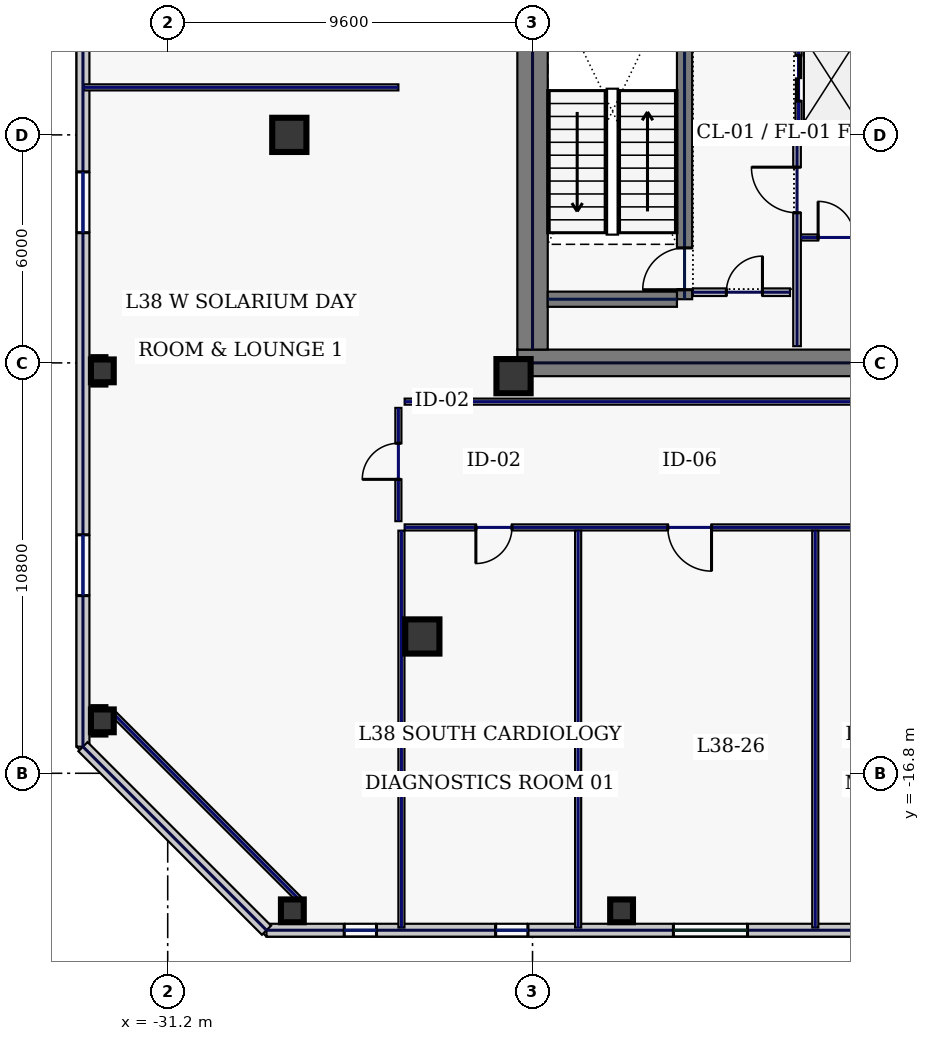
"""IFC4 building model, lengths in metres.
Left out: names, types, materials, properties, quantities, classifications, styles, units other than length and angle.
Written with IfcOpenShell. Run it as: python <this file> out.ifc"""

import sys

from ifc_helpers import new_model, si_unit, direction, frame, frame_2d, origin, origin_2d, place, context, subcontext, project, spatial, rectangle, hollow_rectangle, extrude, element, fill, save


model = new_model("IFC4")
c1 = context("Model", 3, precision=1e-05, world=origin(), true_north=direction((0.0, 1.0)))
c2 = subcontext(c1, "Body", "Model", "MODEL_VIEW")
j1 = project(units=[si_unit("LENGTHUNIT", "METRE"), si_unit("PLANEANGLEUNIT", "RADIAN")], contexts=[c1])
p1 = place(None, origin())
s1 = spatial("IfcSite", under=j1, at=p1, CompositionType="ELEMENT")
p2 = place(p1, origin())
s2 = spatial("IfcBuilding", under=s1, at=p2, CompositionType="ELEMENT")
p3 = place(p2, frame((0.0, 0.0, 168.2)))
s3 = spatial("IfcBuildingStorey", under=s2, at=p3, CompositionType="ELEMENT", Elevation=168.2)
p4 = place(p3, frame((-22.0, -6.0, 0.0), z_axis=(0.0, 0.0, 1.0), x_axis=(1.0, 0.0, 0.0)))
e1 = element("IfcWall", 1, at=p4, inside=s3, PredefinedType="SHEAR", context=c2, shape_type="SweptSolid", body=[
    extrude(rectangle(XDim=11.55, YDim=0.7, at=frame_2d((5.775, 0.0))), origin(), (0.0, 0.0, 1.0), 3.74),
])
p5 = place(p3, frame((-21.6, -5.65, 0.0), z_axis=(0.0, 0.0, 1.0), x_axis=(0.0, 1.0, 0.0)))
e2 = element("IfcWall", 2, at=p5, inside=s3, PredefinedType="SHEAR", context=c2, shape_type="SweptSolid", body=[
    extrude(rectangle(XDim=11.3, YDim=0.8, at=frame_2d((5.65, 0.0))), origin(), (0.0, 0.0, 1.0), 3.74),
])
p6 = place(p3, frame((-17.6, -4.325, 0.0), z_axis=(0.0, 0.0, 1.0), x_axis=(0.0, 1.0, 0.0)))
e3 = element("IfcWall", 3, at=p6, inside=s3, PredefinedType="SHEAR", context=c2, shape_type="SweptSolid", body=[
    extrude(rectangle(XDim=8.65, YDim=0.4, at=frame_2d((4.325, 0.0))), origin(), (0.0, 0.0, 1.0), 3.74),
])
p7 = place(p6, frame((0.25, 0.0, 0.0)))
e4 = element("IfcOpeningElement", 4, at=p7, cuts=e3, PredefinedType="OPENING", context=c2, shape_type="SweptSolid", body=[
    extrude(rectangle(XDim=1.1, YDim=2.2, at=frame_2d((0.55, 1.1))), frame((0.0, 0.21, 0.0), z_axis=(0.0, -1.0, 0.0), x_axis=(1.0, 0.0, 0.0)), (0.0, 0.0, 1.0), 0.42),
])
p8 = place(p3, frame((-21.2, -4.325, 0.0), z_axis=(0.0, 0.0, 1.0), x_axis=(1.0, 0.0, 0.0)))
e5 = element("IfcWall", 5, at=p8, inside=s3, PredefinedType="SHEAR", context=c2, shape_type="SweptSolid", body=[
    extrude(rectangle(XDim=3.4, YDim=0.4, at=frame_2d((1.7, 0.0))), origin(), (0.0, 0.0, 1.0), 3.74),
])
for number, where, z_axis, x_axis in (
    (6, (-22.1, -6.35, 0.0), (0.0, 0.0, 1.0), (1.0, 0.0, 0.0)),
    (7, (-24.5, -13.2, 0.0), (0.0, 0.0, 1.0), (1.0, 0.0, 0.0)),
    (8, (-28.0, 0.0, 0.0), (0.0, 0.0, 1.0), (1.0, 0.0, 0.0)),
):
    element("IfcColumn", number, at=place(p3, frame(where, z_axis=z_axis, x_axis=x_axis)), inside=s3, PredefinedType="COLUMN", context=c2, shape_type="SweptSolid", body=[
        extrude(hollow_rectangle(XDim=0.9, YDim=0.9, WallThickness=0.04, at=origin_2d()), origin(), (0.0, 0.0, 1.0), 3.74),
    ])
for number, where, z_axis, x_axis in (
    (9, (-27.92, -20.42, 0.0), (0.0, 0.0, 1.0), (1.0, 0.0, 0.0)),
    (10, (-19.257, -20.42, 0.0), (0.0, 0.0, 1.0), (1.0, 0.0, 0.0)),
    (11, (-32.92, -6.21, 0.0), (0.0, 0.0, 1.0), (1.0, 0.0, 0.0)),
    (12, (-32.92, -15.42, 0.0), (0.0, 0.0, 1.0), (1.0, 0.0, 0.0)),
):
    element("IfcColumn", number, at=place(p3, frame(where, z_axis=z_axis, x_axis=x_axis)), inside=s3, PredefinedType="COLUMN", context=c2, shape_type="SweptSolid", body=[
        extrude(hollow_rectangle(XDim=0.6, YDim=0.6, WallThickness=0.028, at=origin_2d()), origin(), (0.0, 0.0, 1.0), 3.74),
    ])
p9 = place(p3, frame((-28.6, -20.93, 0.0), z_axis=(0.0, 0.0, 1.0), x_axis=(1.0, 0.0, 0.0)))
e13 = element("IfcWall", 13, at=p9, inside=s3, PredefinedType="STANDARD", context=c2, shape_type="SweptSolid", body=[
    extrude(rectangle(XDim=19.937, YDim=0.34, at=frame_2d((9.969, 0.0))), origin(), (0.0, 0.0, 1.0), 3.74),
])
p10 = place(p9, frame((2.044, 0.0, 0.8)))
e14 = element("IfcOpeningElement", 14, at=p10, cuts=e13, PredefinedType="OPENING", context=c2, shape_type="SweptSolid", body=[
    extrude(rectangle(XDim=0.85, YDim=1.85, at=frame_2d((0.425, 0.925))), frame((0.0, 0.18, 0.0), z_axis=(0.0, -1.0, 0.0), x_axis=(1.0, 0.0, 0.0)), (0.0, 0.0, 1.0), 0.36),
])
p11 = place(p9, frame((6.029, 0.0, 0.8)))
e15 = element("IfcOpeningElement", 15, at=p11, cuts=e13, PredefinedType="OPENING", context=c2, shape_type="SweptSolid", body=[
    extrude(rectangle(XDim=0.85, YDim=1.85, at=frame_2d((0.425, 0.925))), frame((0.0, 0.18, 0.0), z_axis=(0.0, -1.0, 0.0), x_axis=(1.0, 0.0, 0.0)), (0.0, 0.0, 1.0), 0.36),
])
p12 = place(p9, frame((10.707, 0.0, 0.8)))
e16 = element("IfcOpeningElement", 16, at=p12, cuts=e13, PredefinedType="OPENING", context=c2, shape_type="SweptSolid", body=[
    extrude(rectangle(XDim=1.95, YDim=2.1, at=frame_2d((0.975, 1.05))), frame((0.0, 0.18, 0.0), z_axis=(0.0, -1.0, 0.0), x_axis=(1.0, 0.0, 0.0)), (0.0, 0.0, 1.0), 0.36),
])
p13 = place(p9, frame((15.792, 0.0, 0.8)))
e17 = element("IfcOpeningElement", 17, at=p13, cuts=e13, PredefinedType="OPENING", context=c2, shape_type="SweptSolid", body=[
    extrude(rectangle(XDim=0.85, YDim=1.85, at=frame_2d((0.425, 0.925))), frame((0.0, 0.18, 0.0), z_axis=(0.0, -1.0, 0.0), x_axis=(1.0, 0.0, 0.0)), (0.0, 0.0, 1.0), 0.36),
])
p14 = place(p3, frame((-33.43, 22.1, 0.0), z_axis=(0.0, 0.0, 1.0), x_axis=(0.0, -1.0, 0.0)))
e18 = element("IfcWall", 18, at=p14, inside=s3, PredefinedType="STANDARD", context=c2, shape_type="SweptSolid", body=[
    extrude(rectangle(XDim=38.2, YDim=0.34, at=frame_2d((19.1, 0.0))), origin(), (0.0, 0.0, 1.0), 3.74),
])
p15 = place(p14, frame((3.975, 0.0, 0.58)))
e19 = element("IfcOpeningElement", 19, at=p15, cuts=e18, PredefinedType="OPENING", context=c2, shape_type="SweptSolid", body=[
    extrude(rectangle(XDim=1.6, YDim=2.3, at=frame_2d((0.8, 1.15))), frame((0.0, 0.18, 0.0), z_axis=(0.0, -1.0, 0.0), x_axis=(1.0, 0.0, 0.0)), (0.0, 0.0, 1.0), 0.36),
])
p16 = place(p14, frame((13.525, 0.0, 0.58)))
e20 = element("IfcOpeningElement", 20, at=p16, cuts=e18, PredefinedType="OPENING", context=c2, shape_type="SweptSolid", body=[
    extrude(rectangle(XDim=1.6, YDim=2.3, at=frame_2d((0.8, 1.15))), frame((0.0, 0.18, 0.0), z_axis=(0.0, -1.0, 0.0), x_axis=(1.0, 0.0, 0.0)), (0.0, 0.0, 1.0), 0.36),
])
p17 = place(p14, frame((23.075, 0.0, 0.58)))
e21 = element("IfcOpeningElement", 21, at=p17, cuts=e18, PredefinedType="OPENING", context=c2, shape_type="SweptSolid", body=[
    extrude(rectangle(XDim=1.6, YDim=2.3, at=frame_2d((0.8, 1.15))), frame((0.0, 0.18, 0.0), z_axis=(0.0, -1.0, 0.0), x_axis=(1.0, 0.0, 0.0)), (0.0, 0.0, 1.0), 0.36),
])
p18 = place(p14, frame((32.625, 0.0, 0.58)))
e22 = element("IfcOpeningElement", 22, at=p18, cuts=e18, PredefinedType="OPENING", context=c2, shape_type="SweptSolid", body=[
    extrude(rectangle(XDim=1.6, YDim=2.3, at=frame_2d((0.8, 1.15))), frame((0.0, 0.18, 0.0), z_axis=(0.0, -1.0, 0.0), x_axis=(1.0, 0.0, 0.0)), (0.0, 0.0, 1.0), 0.36),
])
p19 = place(p3, frame((-33.43, -16.1, 0.0), z_axis=(0.0, 0.0, 1.0), x_axis=(0.707106781187, -0.707106781187, 0.0)))
e23 = element("IfcWall", 23, at=p19, inside=s3, PredefinedType="STANDARD", context=c2, shape_type="SweptSolid", body=[
    extrude(rectangle(XDim=6.83, YDim=0.34, at=frame_2d((3.415, 0.0))), origin(), (0.0, 0.0, 1.0), 3.74),
])
p20 = place(p3, frame((-14.6, 0.12, 0.0), z_axis=(0.0, 0.0, 1.0), x_axis=(0.0, 1.0, 0.0)))
e24 = element("IfcWall", 24, at=p20, inside=s3, PredefinedType="PARTITIONING", context=c2, shape_type="SweptSolid", body=[
    extrude(rectangle(XDim=2.74, YDim=0.16, at=frame_2d((1.37, 0.0))), origin(), (0.0, 0.0, 1.0), 3.74),
])
p21 = place(p20, frame((0.77, 0.0, 0.0)))
e25 = element("IfcOpeningElement", 25, at=p21, cuts=e24, PredefinedType="OPENING", context=c2, shape_type="SweptSolid", body=[
    extrude(rectangle(XDim=1.2, YDim=2.2, at=frame_2d((0.6, 1.1))), frame((0.0, 0.09, 0.0), z_axis=(0.0, -1.0, 0.0), x_axis=(1.0, 0.0, 0.0)), (0.0, 0.0, 1.0), 0.18),
])
p22 = place(p3, frame((-14.6, 0.1, 0.0), z_axis=(0.0, 0.0, 1.0), x_axis=(1.0, 0.0, 0.0)))
e26 = element("IfcWall", 26, at=p22, inside=s3, PredefinedType="PARTITIONING", context=c2, shape_type="SweptSolid", body=[
    extrude(rectangle(XDim=1.76, YDim=0.16, at=frame_2d((0.88, 0.0))), origin(), (0.0, 0.0, 1.0), 3.74),
])
p23 = place(p3, frame((-17.38, -4.14, 0.0), z_axis=(0.0, 0.0, 1.0), x_axis=(1.0, 0.0, 0.0)))
e27 = element("IfcWall", 27, at=p23, inside=s3, PredefinedType="SOLIDWALL", context=c2, shape_type="SweptSolid", body=[
    extrude(rectangle(XDim=2.555, YDim=0.2, at=frame_2d((1.277, 0.0))), origin(), (0.0, 0.0, 1.0), 3.74),
])
p24 = place(p23, frame((0.88, 0.0, 0.0)))
e28 = element("IfcOpeningElement", 28, at=p24, cuts=e27, PredefinedType="OPENING", context=c2, shape_type="SweptSolid", body=[
    extrude(rectangle(XDim=0.95, YDim=2.2, at=frame_2d((0.475, 1.1))), frame((0.0, 0.11, 0.0), z_axis=(0.0, -1.0, 0.0), x_axis=(1.0, 0.0, 0.0)), (0.0, 0.0, 1.0), 0.22),
])
p25 = place(p3, frame((-14.535, -2.7, 0.0), z_axis=(0.0, 0.0, 1.0), x_axis=(1.0, 0.0, 0.0)))
e29 = element("IfcWall", 29, at=p25, inside=s3, PredefinedType="PARTITIONING", context=c2, shape_type="SweptSolid", body=[
    extrude(rectangle(XDim=1.76, YDim=0.16, at=frame_2d((0.88, 0.0))), origin(), (0.0, 0.0, 1.0), 3.74),
])
p26 = place(p25, frame((0.45, 0.0, 0.0)))
e30 = element("IfcOpeningElement", 30, at=p26, cuts=e29, PredefinedType="OPENING", context=c2, shape_type="SweptSolid", body=[
    extrude(rectangle(XDim=0.95, YDim=2.2, at=frame_2d((0.475, 1.1))), frame((0.0, 0.09, 0.0), z_axis=(0.0, -1.0, 0.0), x_axis=(1.0, 0.0, 0.0)), (0.0, 0.0, 1.0), 0.18),
])
p27 = place(p3, frame((-14.64, -5.56, 0.0), z_axis=(0.0, 0.0, 1.0), x_axis=(0.0, 1.0, 0.0)))
e31 = element("IfcWall", 31, at=p27, inside=s3, PredefinedType="SOLIDWALL", context=c2, shape_type="SweptSolid", body=[
    extrude(rectangle(XDim=5.6, YDim=0.2, at=frame_2d((2.8, 0.0))), origin(), (0.0, 0.0, 1.0), 3.74),
])
p28 = place(p27, frame((3.51, 0.0, 0.0)))
e32 = element("IfcOpeningElement", 32, at=p28, cuts=e31, PredefinedType="OPENING", context=c2, shape_type="SweptSolid", body=[
    extrude(rectangle(XDim=1.2, YDim=2.2, at=frame_2d((0.6, 1.1))), frame((0.0, 0.11, 0.0), z_axis=(0.0, -1.0, 0.0), x_axis=(1.0, 0.0, 0.0)), (0.0, 0.0, 1.0), 0.22),
])
p29 = place(p3, frame((-32.68, -15.18, 0.0), z_axis=(0.0, 0.0, 1.0), x_axis=(0.707106781187, -0.707106781187, 0.0)))
e33 = element("IfcWall", 33, at=p29, inside=s3, PredefinedType="PARTITIONING", context=c2, shape_type="SweptSolid", body=[
    extrude(rectangle(XDim=7.071, YDim=0.16, at=frame_2d((3.536, 0.0))), origin(), (0.0, 0.0, 1.0), 3.74),
])
p30 = place(p3, frame((-25.13, -10.165, 0.0), z_axis=(0.0, 0.0, 1.0), x_axis=(0.0, 1.0, 0.0)))
e34 = element("IfcWall", 34, at=p30, inside=s3, PredefinedType="PARTITIONING", context=c2, shape_type="SweptSolid", body=[
    extrude(rectangle(XDim=2.98, YDim=0.16, at=frame_2d((1.49, 0.0))), origin(), (0.0, 0.0, 1.0), 3.74),
])
p31 = place(p30, frame((1.1, 0.0, 0.0)))
e35 = element("IfcOpeningElement", 35, at=p31, cuts=e34, PredefinedType="OPENING", context=c2, shape_type="SweptSolid", body=[
    extrude(rectangle(XDim=0.95, YDim=2.2, at=frame_2d((0.475, 1.1))), frame((0.0, 0.09, 0.0), z_axis=(0.0, -1.0, 0.0), x_axis=(1.0, 0.0, 0.0)), (0.0, 0.0, 1.0), 0.18),
])
p32 = place(p3, frame((-24.965, -7.02, 0.0), z_axis=(0.0, 0.0, 1.0), x_axis=(1.0, 0.0, 0.0)))
e36 = element("IfcWall", 36, at=p32, inside=s3, PredefinedType="PARTITIONING", context=c2, shape_type="SweptSolid", body=[
    extrude(rectangle(XDim=14.25, YDim=0.16, at=frame_2d((7.125, 0.0))), origin(), (0.0, 0.0, 1.0), 3.74),
])
p33 = place(p3, frame((24.965, -10.33, 0.0), z_axis=(0.0, 0.0, 1.0), x_axis=(-1.0, 0.0, 0.0)))
e37 = element("IfcWall", 37, at=p33, inside=s3, PredefinedType="PARTITIONING", context=c2, shape_type="SweptSolid", body=[
    extrude(rectangle(XDim=49.93, YDim=0.16, at=frame_2d((24.965, 0.0))), origin(), (0.0, 0.0, 1.0), 3.74),
])
p34 = place(p33, frame((47.106, 0.0, 0.0)))
e38 = element("IfcOpeningElement", 38, at=p34, cuts=e37, PredefinedType="OPENING", context=c2, shape_type="SweptSolid", body=[
    extrude(rectangle(XDim=0.95, YDim=2.2, at=frame_2d((0.475, 1.1))), frame((0.0, 0.09, 0.0), z_axis=(0.0, -1.0, 0.0), x_axis=(1.0, 0.0, 0.0)), (0.0, 0.0, 1.0), 0.18),
])
p35 = place(p33, frame((41.855, 0.0, 0.0)))
e39 = element("IfcOpeningElement", 39, at=p35, cuts=e37, PredefinedType="OPENING", context=c2, shape_type="SweptSolid", body=[
    extrude(rectangle(XDim=1.15, YDim=2.2, at=frame_2d((0.575, 1.1))), frame((0.0, 0.09, 0.0), z_axis=(0.0, -1.0, 0.0), x_axis=(1.0, 0.0, 0.0)), (0.0, 0.0, 1.0), 0.18),
])
p36 = place(p33, frame((35.18, 0.0, 0.0)))
e40 = element("IfcOpeningElement", 40, at=p36, cuts=e37, PredefinedType="OPENING", context=c2, shape_type="SweptSolid", body=[
    extrude(rectangle(XDim=1.3, YDim=2.2, at=frame_2d((0.65, 1.1))), frame((0.0, 0.09, 0.0), z_axis=(0.0, -1.0, 0.0), x_axis=(1.0, 0.0, 0.0)), (0.0, 0.0, 1.0), 0.18),
])
p37 = place(p33, frame((27.37, 0.0, 0.0)))
e41 = element("IfcOpeningElement", 41, at=p37, cuts=e37, PredefinedType="OPENING", context=c2, shape_type="SweptSolid", body=[
    extrude(rectangle(XDim=1.05, YDim=2.2, at=frame_2d((0.525, 1.1))), frame((0.0, 0.09, 0.0), z_axis=(0.0, -1.0, 0.0), x_axis=(1.0, 0.0, 0.0)), (0.0, 0.0, 1.0), 0.18),
])
p38 = place(p33, frame((18.72, 0.0, 0.0)))
e42 = element("IfcOpeningElement", 42, at=p38, cuts=e37, PredefinedType="OPENING", context=c2, shape_type="SweptSolid", body=[
    extrude(rectangle(XDim=0.95, YDim=2.2, at=frame_2d((0.475, 1.1))), frame((0.0, 0.09, 0.0), z_axis=(0.0, -1.0, 0.0), x_axis=(1.0, 0.0, 0.0)), (0.0, 0.0, 1.0), 0.18),
])
p39 = place(p33, frame((10.425, 0.0, 0.0)))
e43 = element("IfcOpeningElement", 43, at=p39, cuts=e37, PredefinedType="OPENING", context=c2, shape_type="SweptSolid", body=[
    extrude(rectangle(XDim=0.95, YDim=2.2, at=frame_2d((0.475, 1.1))), frame((0.0, 0.09, 0.0), z_axis=(0.0, -1.0, 0.0), x_axis=(1.0, 0.0, 0.0)), (0.0, 0.0, 1.0), 0.18),
])
p40 = place(p33, frame((3.044, 0.0, 0.0)))
e44 = element("IfcOpeningElement", 44, at=p40, cuts=e37, PredefinedType="OPENING", context=c2, shape_type="SweptSolid", body=[
    extrude(rectangle(XDim=0.95, YDim=2.2, at=frame_2d((0.475, 1.1))), frame((0.0, 0.09, 0.0), z_axis=(0.0, -1.0, 0.0), x_axis=(1.0, 0.0, 0.0)), (0.0, 0.0, 1.0), 0.18),
])
for number, where, z_axis, x_axis in (
    (45, (-25.05, -20.86, 0.0), (0.0, 0.0, 1.0), (0.0, 1.0, 0.0)),
    (46, (-20.4, -20.86, 0.0), (0.0, 0.0, 1.0), (0.0, 1.0, 0.0)),
    (47, (-14.16, -20.86, 0.0), (0.0, 0.0, 1.0), (0.0, 1.0, 0.0)),
):
    element("IfcWall", number, at=place(p3, frame(where, z_axis=z_axis, x_axis=x_axis)), inside=s3, PredefinedType="PARTITIONING", context=c2, shape_type="SweptSolid", body=[
        extrude(rectangle(XDim=10.445, YDim=0.16, at=frame_2d((5.223, 0.0))), origin(), (0.0, 0.0, 1.0), 3.74),
    ])
p41 = place(p3, frame((-33.41, 1.25, 0.0), z_axis=(0.0, 0.0, 1.0), x_axis=(1.0, 0.0, 0.0)))
e48 = element("IfcWall", 48, at=p41, inside=s3, PredefinedType="PARTITIONING", context=c2, shape_type="SweptSolid", body=[
    extrude(rectangle(XDim=8.28, YDim=0.16, at=frame_2d((4.14, 0.0))), origin(), (0.0, 0.0, 1.0), 3.74),
])
p42 = place(p10, origin())
e49 = element("IfcWindow", 49, at=p42, inside=s3, PartitioningType="SINGLE_PANEL", PredefinedType="WINDOW", context=c2, shape_type="SweptSolid", body=[
    extrude(rectangle(XDim=0.85, YDim=1.85, at=frame_2d((0.425, 0.925))), frame((0.0, 0.03, 0.0), z_axis=(0.0, -1.0, 0.0), x_axis=(1.0, 0.0, 0.0)), (0.0, 0.0, 1.0), 0.06),
])
fill(e14, e49)
p43 = place(p11, origin())
e50 = element("IfcWindow", 50, at=p43, inside=s3, PartitioningType="SINGLE_PANEL", PredefinedType="WINDOW", context=c2, shape_type="SweptSolid", body=[
    extrude(rectangle(XDim=0.85, YDim=1.85, at=frame_2d((0.425, 0.925))), frame((0.0, 0.03, 0.0), z_axis=(0.0, -1.0, 0.0), x_axis=(1.0, 0.0, 0.0)), (0.0, 0.0, 1.0), 0.06),
])
fill(e15, e50)
p44 = place(p12, origin())
e51 = element("IfcWindow", 51, at=p44, inside=s3, PartitioningType="SINGLE_PANEL", PredefinedType="WINDOW", context=c2, shape_type="SweptSolid", body=[
    extrude(rectangle(XDim=1.95, YDim=2.1, at=frame_2d((0.975, 1.05))), frame((0.0, 0.03, 0.0), z_axis=(0.0, -1.0, 0.0), x_axis=(1.0, 0.0, 0.0)), (0.0, 0.0, 1.0), 0.06),
])
fill(e16, e51)
p45 = place(p17, origin())
e52 = element("IfcWindow", 52, at=p45, inside=s3, PartitioningType="SINGLE_PANEL", PredefinedType="WINDOW", context=c2, shape_type="SweptSolid", body=[
    extrude(rectangle(XDim=1.6, YDim=2.3, at=frame_2d((0.8, 1.15))), frame((0.0, 0.03, 0.0), z_axis=(0.0, -1.0, 0.0), x_axis=(1.0, 0.0, 0.0)), (0.0, 0.0, 1.0), 0.06),
])
fill(e21, e52)
p46 = place(p18, origin())
e53 = element("IfcWindow", 53, at=p46, inside=s3, PartitioningType="SINGLE_PANEL", PredefinedType="WINDOW", context=c2, shape_type="SweptSolid", body=[
    extrude(rectangle(XDim=1.6, YDim=2.3, at=frame_2d((0.8, 1.15))), frame((0.0, 0.03, 0.0), z_axis=(0.0, -1.0, 0.0), x_axis=(1.0, 0.0, 0.0)), (0.0, 0.0, 1.0), 0.06),
])
fill(e22, e53)
p47 = place(p7, origin())
e54 = element("IfcDoor", 54, at=p47, inside=s3, OperationType="SINGLE_SWING_LEFT", PredefinedType="DOOR", context=c2, shape_type="SweptSolid", body=[
    extrude(rectangle(XDim=1.1, YDim=2.2, at=frame_2d((0.55, 1.1))), frame((0.0, 0.025, 0.0), z_axis=(0.0, -1.0, 0.0), x_axis=(1.0, 0.0, 0.0)), (0.0, 0.0, 1.0), 0.05),
])
fill(e4, e54)
p48 = place(p21, origin())
e55 = element("IfcDoor", 55, at=p48, inside=s3, OperationType="SLIDING_TO_LEFT", PredefinedType="DOOR", context=c2, shape_type="SweptSolid", body=[
    extrude(rectangle(XDim=1.2, YDim=2.2, at=frame_2d((0.6, 1.1))), frame((0.0, 0.025, 0.0), z_axis=(0.0, -1.0, 0.0), x_axis=(1.0, 0.0, 0.0)), (0.0, 0.0, 1.0), 0.05),
])
fill(e25, e55)
p49 = place(p24, origin())
e56 = element("IfcDoor", 56, at=p49, inside=s3, OperationType="SINGLE_SWING_RIGHT", PredefinedType="DOOR", context=c2, shape_type="SweptSolid", body=[
    extrude(rectangle(XDim=0.95, YDim=2.2, at=frame_2d((0.475, 1.1))), frame((0.0, 0.025, 0.0), z_axis=(0.0, -1.0, 0.0), x_axis=(1.0, 0.0, 0.0)), (0.0, 0.0, 1.0), 0.05),
])
fill(e28, e56)
p50 = place(p26, origin())
e57 = element("IfcDoor", 57, at=p50, inside=s3, OperationType="SINGLE_SWING_LEFT", PredefinedType="DOOR", context=c2, shape_type="SweptSolid", body=[
    extrude(rectangle(XDim=0.95, YDim=2.2, at=frame_2d((0.475, 1.1))), frame((0.0, 0.025, 0.0), z_axis=(0.0, -1.0, 0.0), x_axis=(1.0, 0.0, 0.0)), (0.0, 0.0, 1.0), 0.05),
])
fill(e30, e57)
p51 = place(p28, origin())
e58 = element("IfcDoor", 58, at=p51, inside=s3, OperationType="SINGLE_SWING_RIGHT", PredefinedType="DOOR", context=c2, shape_type="SweptSolid", body=[
    extrude(rectangle(XDim=1.2, YDim=2.2, at=frame_2d((0.6, 1.1))), frame((0.0, 0.025, 0.0), z_axis=(0.0, -1.0, 0.0), x_axis=(1.0, 0.0, 0.0)), (0.0, 0.0, 1.0), 0.05),
])
fill(e32, e58)
p52 = place(p34, origin())
e59 = element("IfcDoor", 59, at=p52, inside=s3, OperationType="SINGLE_SWING_RIGHT", PredefinedType="DOOR", context=c2, shape_type="SweptSolid", body=[
    extrude(rectangle(XDim=0.95, YDim=2.2, at=frame_2d((0.475, 1.1))), frame((0.0, 0.025, 0.0), z_axis=(0.0, -1.0, 0.0), x_axis=(1.0, 0.0, 0.0)), (0.0, 0.0, 1.0), 0.05),
])
fill(e38, e59)
p53 = place(p35, origin())
e60 = element("IfcDoor", 60, at=p53, inside=s3, OperationType="SINGLE_SWING_LEFT", PredefinedType="DOOR", context=c2, shape_type="SweptSolid", body=[
    extrude(rectangle(XDim=1.15, YDim=2.2, at=frame_2d((0.575, 1.1))), frame((0.0, 0.025, 0.0), z_axis=(0.0, -1.0, 0.0), x_axis=(1.0, 0.0, 0.0)), (0.0, 0.0, 1.0), 0.05),
])
fill(e39, e60)
p54 = place(p31, origin())
e61 = element("IfcDoor", 61, at=p54, inside=s3, OperationType="SINGLE_SWING_LEFT", PredefinedType="DOOR", context=c2, shape_type="SweptSolid", body=[
    extrude(rectangle(XDim=0.95, YDim=2.2, at=frame_2d((0.475, 1.1))), frame((0.0, 0.025, 0.0), z_axis=(0.0, -1.0, 0.0), x_axis=(1.0, 0.0, 0.0)), (0.0, 0.0, 1.0), 0.05),
])
fill(e35, e61)
save(model, sys.argv[1])
